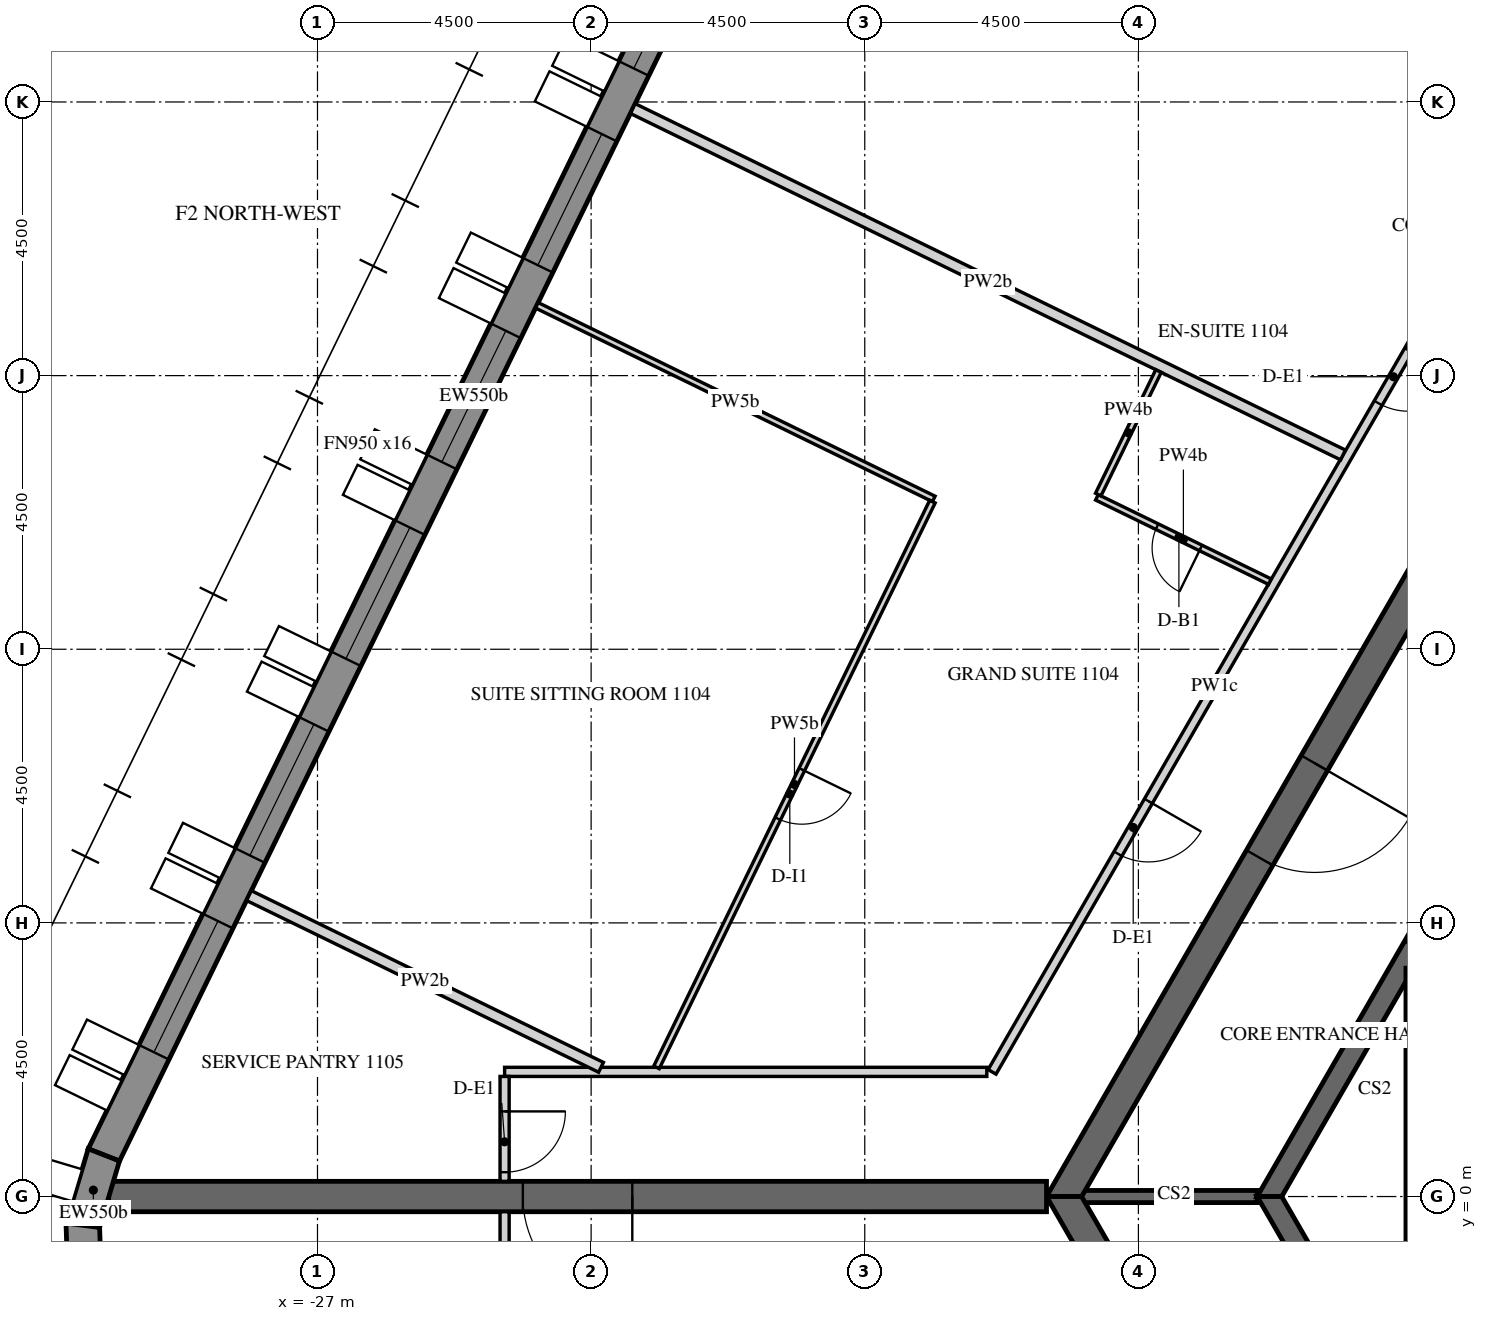
"""IFC4 building model, lengths in metres.
Left out: names, types, materials, properties, quantities, classifications, styles, units other than length and angle.
Written with IfcOpenShell. Run it as: python <this file> out.ifc"""

import sys

from ifc_helpers import new_model, si_unit, direction, frame, frame_2d, origin, place, context, subcontext, project, spatial, polyline, rectangle, outline, extrude, element, fill, save


model = new_model("IFC4")
c1 = context("Model", 3, precision=1e-05, world=origin(), true_north=direction((0.0, 1.0)))
c2 = subcontext(c1, "Body", "Model", "MODEL_VIEW")
j1 = project(units=[si_unit("LENGTHUNIT", "METRE"), si_unit("PLANEANGLEUNIT", "RADIAN")], contexts=[c1])
p1 = place(None, origin())
s1 = spatial("IfcSite", under=j1, at=p1, CompositionType="ELEMENT")
p2 = place(p1, origin())
s2 = spatial("IfcBuilding", under=s1, at=p2, CompositionType="ELEMENT")
p3 = place(p2, frame((0.0, 0.0, 152.7)))
s3 = spatial("IfcBuildingStorey", under=s2, at=p3, CompositionType="ELEMENT", Elevation=152.7)
p4 = place(p3, frame((-18.345, 25.633, 0.0), z_axis=(0.0, 0.0, 1.0), x_axis=(-0.43837181828, -0.898793718791, 0.0)))
e1 = element("IfcWall", 1, at=p4, inside=s3, PredefinedType="SOLIDWALL", context=c2, shape_type="SweptSolid", body=[
    extrude(outline(polyline([(-0.026, -0.275), (27.78, -0.275), (27.735, 0.275), (0.026, 0.275), (-0.026, -0.275)])), origin(), (0.0, 0.0, 1.0), 3.75),
])
p5 = place(p4, frame((1.879, 0.0, 0.9)))
e2 = element("IfcOpeningElement", 2, at=p5, cuts=e1, PredefinedType="OPENING", context=c2, shape_type="SweptSolid", body=[
    extrude(rectangle(XDim=2.4, YDim=2.4, at=frame_2d((1.2, 1.2))), frame((0.0, 0.285, 0.0), z_axis=(0.0, -1.0, 0.0), x_axis=(1.0, 0.0, 0.0)), (0.0, 0.0, 1.0), 0.57),
])
p6 = place(p4, frame((5.479, 0.0, 0.9)))
e3 = element("IfcOpeningElement", 3, at=p6, cuts=e1, PredefinedType="OPENING", context=c2, shape_type="SweptSolid", body=[
    extrude(rectangle(XDim=2.4, YDim=2.4, at=frame_2d((1.2, 1.2))), frame((0.0, 0.285, 0.0), z_axis=(0.0, -1.0, 0.0), x_axis=(1.0, 0.0, 0.0)), (0.0, 0.0, 1.0), 0.57),
])
p7 = place(p4, frame((9.079, 0.0, 0.9)))
e4 = element("IfcOpeningElement", 4, at=p7, cuts=e1, PredefinedType="OPENING", context=c2, shape_type="SweptSolid", body=[
    extrude(rectangle(XDim=2.4, YDim=2.4, at=frame_2d((1.2, 1.2))), frame((0.0, 0.285, 0.0), z_axis=(0.0, -1.0, 0.0), x_axis=(1.0, 0.0, 0.0)), (0.0, 0.0, 1.0), 0.57),
])
p8 = place(p4, frame((12.679, 0.0, 0.9)))
e5 = element("IfcOpeningElement", 5, at=p8, cuts=e1, PredefinedType="OPENING", context=c2, shape_type="SweptSolid", body=[
    extrude(rectangle(XDim=2.4, YDim=2.4, at=frame_2d((1.2, 1.2))), frame((0.0, 0.285, 0.0), z_axis=(0.0, -1.0, 0.0), x_axis=(1.0, 0.0, 0.0)), (0.0, 0.0, 1.0), 0.57),
])
p9 = place(p4, frame((16.279, 0.0, 0.9)))
e6 = element("IfcOpeningElement", 6, at=p9, cuts=e1, PredefinedType="OPENING", context=c2, shape_type="SweptSolid", body=[
    extrude(rectangle(XDim=2.4, YDim=2.4, at=frame_2d((1.2, 1.2))), frame((0.0, 0.285, 0.0), z_axis=(0.0, -1.0, 0.0), x_axis=(1.0, 0.0, 0.0)), (0.0, 0.0, 1.0), 0.57),
])
p10 = place(p4, frame((19.879, 0.0, 0.9)))
e7 = element("IfcOpeningElement", 7, at=p10, cuts=e1, PredefinedType="OPENING", context=c2, shape_type="SweptSolid", body=[
    extrude(rectangle(XDim=2.4, YDim=2.4, at=frame_2d((1.2, 1.2))), frame((0.0, 0.285, 0.0), z_axis=(0.0, -1.0, 0.0), x_axis=(1.0, 0.0, 0.0)), (0.0, 0.0, 1.0), 0.57),
])
p11 = place(p4, frame((23.479, 0.0, 0.9)))
e8 = element("IfcOpeningElement", 8, at=p11, cuts=e1, PredefinedType="OPENING", context=c2, shape_type="SweptSolid", body=[
    extrude(rectangle(XDim=2.4, YDim=2.4, at=frame_2d((1.2, 1.2))), frame((0.0, 0.285, 0.0), z_axis=(0.0, -1.0, 0.0), x_axis=(1.0, 0.0, 0.0)), (0.0, 0.0, 1.0), 0.57),
])
p12 = place(p3, frame((-30.513, 0.684, 0.0), z_axis=(0.0, 0.0, 1.0), x_axis=(-0.286736058109, -0.958009620505, 0.0)))
e9 = element("IfcWall", 9, at=p12, inside=s3, PredefinedType="SOLIDWALL", context=c2, shape_type="SweptSolid", body=[
    extrude(outline(polyline([(-0.022, -0.275), (1.253, -0.275), (1.163, 0.275), (0.022, 0.275), (-0.022, -0.275)])), origin(), (0.0, 0.0, 1.0), 3.75),
])
p13 = place(p3, frame((-30.86, -0.473, 0.0), z_axis=(0.0, 0.0, 1.0), x_axis=(0.03495638276, -0.999388838893, 0.0)))
e10 = element("IfcWall", 10, at=p13, inside=s3, PredefinedType="SOLIDWALL", context=c2, shape_type="SweptSolid", body=[
    extrude(outline(polyline([(-0.045, -0.275), (1.253, -0.275), (1.163, 0.275), (0.045, 0.275), (-0.045, -0.275)])), origin(), (0.0, 0.0, 1.0), 3.75),
])
p14 = place(p3, frame((-7.361, 12.75, 0.0), z_axis=(0.0, 0.0, 1.0), x_axis=(-0.50000571537, -0.866022103989, 0.0)))
e11 = element("IfcWall", 11, at=p14, inside=s3, PredefinedType="SHEAR", context=c2, shape_type="SweptSolid", body=[
    extrude(outline(polyline([(-0.144, -0.25), (14.867, -0.25), (14.578, 0.25), (0.144, 0.25), (-0.144, -0.25)])), origin(), (0.0, 0.0, 1.0), 3.75),
])
p15 = place(p14, frame((6.49, 0.0, 0.0)))
e12 = element("IfcOpeningElement", 12, at=p15, cuts=e11, PredefinedType="OPENING", context=c2, shape_type="SweptSolid", body=[
    extrude(rectangle(XDim=1.8, YDim=2.4, at=frame_2d((0.9, 1.2))), frame((0.0, 0.26, 0.0), z_axis=(0.0, -1.0, 0.0), x_axis=(1.0, 0.0, 0.0)), (0.0, 0.0, 1.0), 0.52),
])
p16 = place(p3, frame((-14.722, 0.0, 0.0), z_axis=(0.0, 0.0, 1.0), x_axis=(0.50000571537, -0.866022103989, 0.0)))
e13 = element("IfcWall", 13, at=p16, inside=s3, PredefinedType="SHEAR", context=c2, shape_type="SweptSolid", body=[
    extrude(outline(polyline([(-0.144, -0.25), (14.867, -0.25), (14.578, 0.25), (0.144, 0.25), (-0.144, -0.25)])), origin(), (0.0, 0.0, 1.0), 3.75),
])
p17 = place(p16, frame((6.432, 0.0, 0.0)))
e14 = element("IfcOpeningElement", 14, at=p17, cuts=e13, PredefinedType="OPENING", context=c2, shape_type="SweptSolid", body=[
    extrude(rectangle(XDim=1.8, YDim=2.4, at=frame_2d((0.9, 1.2))), frame((0.0, 0.26, 0.0), z_axis=(0.0, -1.0, 0.0), x_axis=(1.0, 0.0, 0.0)), (0.0, 0.0, 1.0), 0.52),
])
p18 = place(p3, frame((-15.011, 0.0, 0.0), z_axis=(0.0, 0.0, 1.0), x_axis=(-1.0, 0.0, 0.0)))
e15 = element("IfcWall", 15, at=p18, inside=s3, PredefinedType="SHEAR", context=c2, shape_type="SweptSolid", body=[
    extrude(rectangle(XDim=15.424, YDim=0.5, at=frame_2d((7.712, 0.0))), origin(), (0.0, 0.0, 1.0), 3.75),
])
p19 = place(p18, frame((6.812, 0.0, 0.0)))
e16 = element("IfcOpeningElement", 16, at=p19, cuts=e15, PredefinedType="OPENING", context=c2, shape_type="SweptSolid", body=[
    extrude(rectangle(XDim=1.8, YDim=2.4, at=frame_2d((0.9, 1.2))), frame((0.0, 0.26, 0.0), z_axis=(0.0, -1.0, 0.0), x_axis=(1.0, 0.0, 0.0)), (0.0, 0.0, 1.0), 0.52),
])
p20 = place(p3, frame((-5.673, 9.825, 0.0), z_axis=(0.0, 0.0, 1.0), x_axis=(-0.499995046907, -0.866028263435, 0.0)))
e17 = element("IfcWall", 17, at=p20, inside=s3, PredefinedType="SHEAR", context=c2, shape_type="SweptSolid", body=[
    extrude(outline(polyline([(-0.101, -0.175), (11.446, -0.175), (11.244, 0.175), (0.101, 0.175), (-0.101, -0.175)])), origin(), (0.0, 0.0, 1.0), 3.75),
])
p21 = place(p20, frame((4.801, 0.0, 0.0)))
e18 = element("IfcOpeningElement", 18, at=p21, cuts=e17, PredefinedType="OPENING", context=c2, shape_type="SweptSolid", body=[
    extrude(rectangle(XDim=1.8, YDim=2.4, at=frame_2d((0.9, 1.2))), frame((0.0, 0.185, 0.0), z_axis=(0.0, -1.0, 0.0), x_axis=(1.0, 0.0, 0.0)), (0.0, 0.0, 1.0), 0.37),
])
p22 = place(p3, frame((-11.345, 0.0, 0.0), z_axis=(0.0, 0.0, 1.0), x_axis=(0.499995046907, -0.866028263435, 0.0)))
e19 = element("IfcWall", 19, at=p22, inside=s3, PredefinedType="SHEAR", context=c2, shape_type="SweptSolid", body=[
    extrude(outline(polyline([(-0.101, -0.175), (11.446, -0.175), (11.244, 0.175), (0.101, 0.175), (-0.101, -0.175)])), origin(), (0.0, 0.0, 1.0), 3.75),
])
p23 = place(p22, frame((4.744, 0.0, 0.0)))
e20 = element("IfcOpeningElement", 20, at=p23, cuts=e19, PredefinedType="OPENING", context=c2, shape_type="SweptSolid", body=[
    extrude(rectangle(XDim=1.8, YDim=2.4, at=frame_2d((0.9, 1.2))), frame((0.0, 0.185, 0.0), z_axis=(0.0, -1.0, 0.0), x_axis=(1.0, 0.0, 0.0)), (0.0, 0.0, 1.0), 0.37),
])
p24 = place(p3, frame((-11.547, 0.0, 0.0), z_axis=(0.0, 0.0, 1.0), x_axis=(-1.0, 0.0, 0.0)))
e21 = element("IfcWall", 21, at=p24, inside=s3, PredefinedType="SHEAR", context=c2, shape_type="SweptSolid", body=[
    extrude(rectangle(XDim=2.887, YDim=0.2, at=frame_2d((1.443, 0.0))), origin(), (0.0, 0.0, 1.0), 3.75),
])
p25 = place(p3, frame((-8.975, -3.755, -0.5), z_axis=(0.0, 0.0, 1.0), x_axis=(0.0, 1.0, 0.0)))
e22 = element("IfcWall", 22, at=p25, inside=s3, PredefinedType="SHEAR", context=c2, shape_type="SweptSolid", body=[
    extrude(rectangle(XDim=7.51, YDim=0.25, at=frame_2d((3.755, 0.0))), origin(), (0.0, 0.0, 1.0), 4.15),
])
p26 = place(p3, frame((-8.588, 14.725, 0.0), z_axis=(0.0, 0.0, 1.0), x_axis=(-0.499996322767, -0.866027526826, 0.0)))
e23 = element("IfcWall", 23, at=p26, inside=s3, PredefinedType="PARTITIONING", context=c2, shape_type="SweptSolid", body=[
    extrude(rectangle(XDim=14.636, YDim=0.15, at=frame_2d((7.318, 0.0))), origin(), (0.0, 0.0, 1.0), 2.823),
])
p27 = place(p26, frame((0.936, 0.0, 0.0)))
e24 = element("IfcOpeningElement", 24, at=p27, cuts=e23, PredefinedType="OPENING", context=c2, shape_type="SweptSolid", body=[
    extrude(rectangle(XDim=1.0, YDim=2.1, at=frame_2d((0.5, 1.05))), frame((0.0, 0.085, 0.0), z_axis=(0.0, -1.0, 0.0), x_axis=(1.0, 0.0, 0.0)), (0.0, 0.0, 1.0), 0.17),
])
p28 = place(p26, frame((9.495, 0.0, 0.0)))
e25 = element("IfcOpeningElement", 25, at=p28, cuts=e23, PredefinedType="OPENING", context=c2, shape_type="SweptSolid", body=[
    extrude(rectangle(XDim=1.0, YDim=2.1, at=frame_2d((0.5, 1.05))), frame((0.0, 0.085, 0.0), z_axis=(0.0, -1.0, 0.0), x_axis=(1.0, 0.0, 0.0)), (0.0, 0.0, 1.0), 0.17),
])
p29 = place(p3, frame((-15.993, 2.05, 0.0), z_axis=(0.0, 0.0, 1.0), x_axis=(-1.0, 0.0, 0.0)))
e26 = element("IfcWall", 26, at=p29, inside=s3, PredefinedType="PARTITIONING", context=c2, shape_type="SweptSolid", body=[
    extrude(rectangle(XDim=7.93, YDim=0.15, at=frame_2d((3.965, 0.0))), origin(), (0.0, 0.0, 1.0), 2.823),
])
p30 = place(p3, frame((-23.923, 1.975, 0.0), z_axis=(0.0, 0.0, 1.0), x_axis=(0.0, -1.0, 0.0)))
e27 = element("IfcWall", 27, at=p30, inside=s3, PredefinedType="PARTITIONING", context=c2, shape_type="SweptSolid", body=[
    extrude(rectangle(XDim=1.725, YDim=0.15, at=frame_2d((0.863, 0.0))), origin(), (0.0, 0.0, 1.0), 2.823),
])
p31 = place(p30, frame((0.575, 0.0, 0.0)))
e28 = element("IfcOpeningElement", 28, at=p31, cuts=e27, PredefinedType="OPENING", context=c2, shape_type="SweptSolid", body=[
    extrude(rectangle(XDim=1.0, YDim=2.1, at=frame_2d((0.5, 1.05))), frame((0.0, 0.085, 0.0), z_axis=(0.0, -1.0, 0.0), x_axis=(1.0, 0.0, 0.0)), (0.0, 0.0, 1.0), 0.17),
])
p32 = place(p3, frame((-23.923, -0.25, 0.0), z_axis=(0.0, 0.0, 1.0), x_axis=(0.0, -1.0, 0.0)))
e29 = element("IfcWall", 29, at=p32, inside=s3, PredefinedType="PARTITIONING", context=c2, shape_type="SweptSolid", body=[
    extrude(rectangle(XDim=1.8, YDim=0.15, at=frame_2d((0.9, 0.0))), origin(), (0.0, 0.0, 1.0), 2.823),
])
p33 = place(p3, frame((-21.815, 17.892, 0.0), z_axis=(0.0, 0.0, 1.0), x_axis=(0.898798778742, -0.43836144371, 0.0)))
e30 = element("IfcWall", 30, at=p33, inside=s3, PredefinedType="PARTITIONING", context=c2, shape_type="SweptSolid", body=[
    extrude(rectangle(XDim=12.994, YDim=0.18, at=frame_2d((6.497, 0.0))), origin(), (0.0, 0.0, 1.0), 2.823),
])
p34 = place(p3, frame((-11.338, 10.112, 0.0), z_axis=(0.0, 0.0, 1.0), x_axis=(-0.898781792608, 0.438396269688, 0.0)))
e31 = element("IfcWall", 31, at=p34, inside=s3, PredefinedType="PARTITIONING", context=c2, shape_type="SweptSolid", body=[
    extrude(rectangle(XDim=3.164, YDim=0.1, at=frame_2d((1.582, 0.0))), origin(), (0.0, 0.0, 1.0), 2.823),
])
p35 = place(p34, frame((1.264, 0.0, 0.0)))
e32 = element("IfcOpeningElement", 32, at=p35, cuts=e31, PredefinedType="OPENING", context=c2, shape_type="SweptSolid", body=[
    extrude(rectangle(XDim=0.8, YDim=2.1, at=frame_2d((0.4, 1.05))), frame((0.0, 0.06, 0.0), z_axis=(0.0, -1.0, 0.0), x_axis=(1.0, 0.0, 0.0)), (0.0, 0.0, 1.0), 0.12),
])
p36 = place(p3, frame((-14.16, 11.544, 0.0), z_axis=(0.0, 0.0, 1.0), x_axis=(0.438376807268, 0.898791285477, 0.0)))
e33 = element("IfcWall", 33, at=p36, inside=s3, PredefinedType="PARTITIONING", context=c2, shape_type="SweptSolid", body=[
    extrude(rectangle(XDim=2.26, YDim=0.1, at=frame_2d((1.13, 0.0))), origin(), (0.0, 0.0, 1.0), 2.823),
])
p37 = place(p3, frame((-23.393, 14.656, 0.0), z_axis=(0.0, 0.0, 1.0), x_axis=(0.898794291179, -0.43837064471, 0.0)))
e34 = element("IfcWall", 34, at=p37, inside=s3, PredefinedType="PARTITIONING", context=c2, shape_type="SweptSolid", body=[
    extrude(rectangle(XDim=7.262, YDim=0.1, at=frame_2d((3.631, 0.0))), origin(), (0.0, 0.0, 1.0), 2.823),
])
p38 = place(p3, frame((-16.887, 11.427, 0.0), z_axis=(0.0, 0.0, 1.0), x_axis=(-0.438369721011, -0.898794741696, 0.0)))
e35 = element("IfcWall", 35, at=p38, inside=s3, PredefinedType="PARTITIONING", context=c2, shape_type="SweptSolid", body=[
    extrude(rectangle(XDim=10.35, YDim=0.1, at=frame_2d((5.175, 0.0))), origin(), (0.0, 0.0, 1.0), 2.823),
])
p39 = place(p38, frame((4.9, 0.0, 0.0)))
e36 = element("IfcOpeningElement", 36, at=p39, cuts=e35, PredefinedType="OPENING", context=c2, shape_type="SweptSolid", body=[
    extrude(rectangle(XDim=0.9, YDim=2.1, at=frame_2d((0.45, 1.05))), frame((0.0, 0.06, 0.0), z_axis=(0.0, -1.0, 0.0), x_axis=(1.0, 0.0, 0.0)), (0.0, 0.0, 1.0), 0.12),
])
p40 = place(p3, frame((-28.127, 4.949, 0.0), z_axis=(0.0, 0.0, 1.0), x_axis=(0.898795032868, -0.438369124017, 0.0)))
e37 = element("IfcWall", 37, at=p40, inside=s3, PredefinedType="PARTITIONING", context=c2, shape_type="SweptSolid", body=[
    extrude(rectangle(XDim=6.442, YDim=0.18, at=frame_2d((3.221, 0.0))), origin(), (0.0, 0.0, 1.0), 2.823),
])
p41 = place(p6, frame((0.0, 0.205, 0.0)))
e38 = element("IfcWindow", 38, at=p41, inside=s3, PartitioningType="DOUBLE_PANEL_VERTICAL", PredefinedType="WINDOW", context=c2, shape_type="SweptSolid", body=[
    extrude(rectangle(XDim=2.4, YDim=2.4, at=frame_2d((1.2, 1.2))), frame((0.0, 0.03, 0.0), z_axis=(0.0, -1.0, 0.0), x_axis=(1.0, 0.0, 0.0)), (0.0, 0.0, 1.0), 0.06),
])
fill(e3, e38)
p42 = place(p7, frame((0.0, 0.205, 0.0)))
e39 = element("IfcWindow", 39, at=p42, inside=s3, PartitioningType="DOUBLE_PANEL_VERTICAL", PredefinedType="WINDOW", context=c2, shape_type="SweptSolid", body=[
    extrude(rectangle(XDim=2.4, YDim=2.4, at=frame_2d((1.2, 1.2))), frame((0.0, 0.03, 0.0), z_axis=(0.0, -1.0, 0.0), x_axis=(1.0, 0.0, 0.0)), (0.0, 0.0, 1.0), 0.06),
])
fill(e4, e39)
p43 = place(p8, frame((0.0, 0.205, 0.0)))
e40 = element("IfcWindow", 40, at=p43, inside=s3, PartitioningType="DOUBLE_PANEL_VERTICAL", PredefinedType="WINDOW", context=c2, shape_type="SweptSolid", body=[
    extrude(rectangle(XDim=2.4, YDim=2.4, at=frame_2d((1.2, 1.2))), frame((0.0, 0.03, 0.0), z_axis=(0.0, -1.0, 0.0), x_axis=(1.0, 0.0, 0.0)), (0.0, 0.0, 1.0), 0.06),
])
fill(e5, e40)
p44 = place(p9, frame((0.0, 0.205, 0.0)))
e41 = element("IfcWindow", 41, at=p44, inside=s3, PartitioningType="DOUBLE_PANEL_VERTICAL", PredefinedType="WINDOW", context=c2, shape_type="SweptSolid", body=[
    extrude(rectangle(XDim=2.4, YDim=2.4, at=frame_2d((1.2, 1.2))), frame((0.0, 0.03, 0.0), z_axis=(0.0, -1.0, 0.0), x_axis=(1.0, 0.0, 0.0)), (0.0, 0.0, 1.0), 0.06),
])
fill(e6, e41)
p45 = place(p10, frame((0.0, 0.205, 0.0)))
e42 = element("IfcWindow", 42, at=p45, inside=s3, PartitioningType="DOUBLE_PANEL_VERTICAL", PredefinedType="WINDOW", context=c2, shape_type="SweptSolid", body=[
    extrude(rectangle(XDim=2.4, YDim=2.4, at=frame_2d((1.2, 1.2))), frame((0.0, 0.03, 0.0), z_axis=(0.0, -1.0, 0.0), x_axis=(1.0, 0.0, 0.0)), (0.0, 0.0, 1.0), 0.06),
])
fill(e7, e42)
p46 = place(p11, frame((0.0, 0.205, 0.0)))
e43 = element("IfcWindow", 43, at=p46, inside=s3, PartitioningType="DOUBLE_PANEL_VERTICAL", PredefinedType="WINDOW", context=c2, shape_type="SweptSolid", body=[
    extrude(rectangle(XDim=2.4, YDim=2.4, at=frame_2d((1.2, 1.2))), frame((0.0, 0.03, 0.0), z_axis=(0.0, -1.0, 0.0), x_axis=(1.0, 0.0, 0.0)), (0.0, 0.0, 1.0), 0.06),
])
fill(e8, e43)
p47 = place(p15, origin())
e44 = element("IfcDoor", 44, at=p47, inside=s3, OperationType="DOUBLE_DOOR_SINGLE_SWING", PredefinedType="DOOR", context=c2, shape_type="SweptSolid", body=[
    extrude(rectangle(XDim=1.8, YDim=2.4, at=frame_2d((0.9, 1.2))), frame((0.0, 0.025, 0.0), z_axis=(0.0, -1.0, 0.0), x_axis=(1.0, 0.0, 0.0)), (0.0, 0.0, 1.0), 0.05),
])
fill(e12, e44)
p48 = place(p19, origin())
e45 = element("IfcDoor", 45, at=p48, inside=s3, OperationType="DOUBLE_DOOR_SINGLE_SWING", PredefinedType="DOOR", context=c2, shape_type="SweptSolid", body=[
    extrude(rectangle(XDim=1.8, YDim=2.4, at=frame_2d((0.9, 1.2))), frame((0.0, 0.025, 0.0), z_axis=(0.0, -1.0, 0.0), x_axis=(1.0, 0.0, 0.0)), (0.0, 0.0, 1.0), 0.05),
])
fill(e16, e45)
p49 = place(p27, origin())
e46 = element("IfcDoor", 46, at=p49, inside=s3, OperationType="SINGLE_SWING_RIGHT", PredefinedType="DOOR", context=c2, shape_type="SweptSolid", body=[
    extrude(rectangle(XDim=1.0, YDim=2.1, at=frame_2d((0.5, 1.05))), frame((0.0, 0.025, 0.0), z_axis=(0.0, -1.0, 0.0), x_axis=(1.0, 0.0, 0.0)), (0.0, 0.0, 1.0), 0.05),
])
fill(e24, e46)
p50 = place(p28, origin())
e47 = element("IfcDoor", 47, at=p50, inside=s3, OperationType="SINGLE_SWING_RIGHT", PredefinedType="DOOR", context=c2, shape_type="SweptSolid", body=[
    extrude(rectangle(XDim=1.0, YDim=2.1, at=frame_2d((0.5, 1.05))), frame((0.0, 0.025, 0.0), z_axis=(0.0, -1.0, 0.0), x_axis=(1.0, 0.0, 0.0)), (0.0, 0.0, 1.0), 0.05),
])
fill(e25, e47)
p51 = place(p35, origin())
e48 = element("IfcDoor", 48, at=p51, inside=s3, OperationType="SINGLE_SWING_LEFT", PredefinedType="DOOR", context=c2, shape_type="SweptSolid", body=[
    extrude(rectangle(XDim=0.8, YDim=2.1, at=frame_2d((0.4, 1.05))), frame((0.0, 0.025, 0.0), z_axis=(0.0, -1.0, 0.0), x_axis=(1.0, 0.0, 0.0)), (0.0, 0.0, 1.0), 0.05),
])
fill(e32, e48)
p52 = place(p39, origin())
e49 = element("IfcDoor", 49, at=p52, inside=s3, OperationType="SINGLE_SWING_LEFT", PredefinedType="DOOR", context=c2, shape_type="SweptSolid", body=[
    extrude(rectangle(XDim=0.9, YDim=2.1, at=frame_2d((0.45, 1.05))), frame((0.0, 0.025, 0.0), z_axis=(0.0, -1.0, 0.0), x_axis=(1.0, 0.0, 0.0)), (0.0, 0.0, 1.0), 0.05),
])
fill(e36, e49)
p53 = place(p31, origin())
e50 = element("IfcDoor", 50, at=p53, inside=s3, OperationType="SINGLE_SWING_LEFT", PredefinedType="DOOR", context=c2, shape_type="SweptSolid", body=[
    extrude(rectangle(XDim=1.0, YDim=2.1, at=frame_2d((0.5, 1.05))), frame((0.0, 0.025, 0.0), z_axis=(0.0, -1.0, 0.0), x_axis=(1.0, 0.0, 0.0)), (0.0, 0.0, 1.0), 0.05),
])
fill(e28, e50)
save(model, sys.argv[1])
